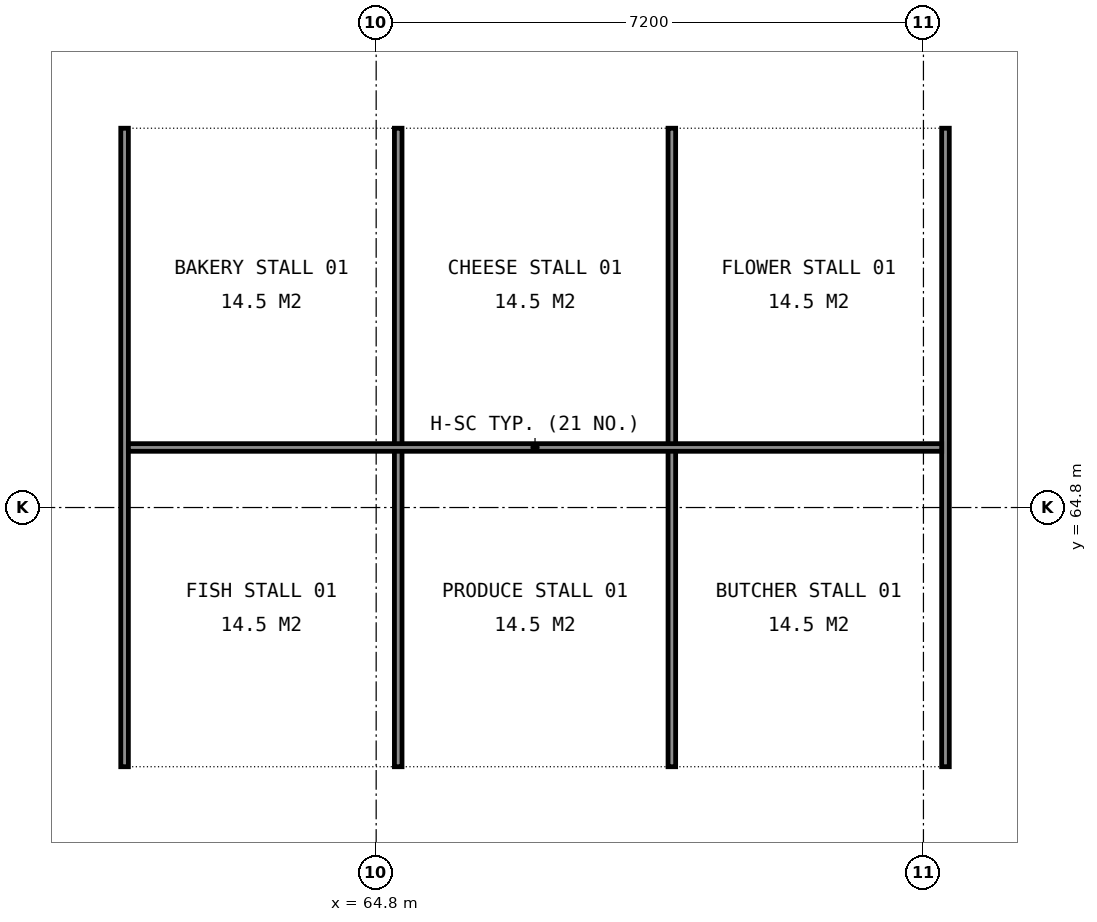
"""IFC4 building model, lengths in metres.
Left out: names, types, materials, properties, quantities, classifications, styles, units other than length and angle.
Written with IfcOpenShell. Run it as: python <this file> out.ifc"""

import sys

from ifc_helpers import new_model, si_unit, direction, frame, frame_2d, origin, place, context, subcontext, project, spatial, rectangle, extrude, element, save


model = new_model("IFC4")
c1 = context("Model", 3, precision=1e-05, world=origin(), true_north=direction((0.0, 1.0)))
c2 = subcontext(c1, "Body", "Model", "MODEL_VIEW")
j1 = project(units=[si_unit("LENGTHUNIT", "METRE"), si_unit("PLANEANGLEUNIT", "RADIAN")], contexts=[c1])
p1 = place(None, origin())
s1 = spatial("IfcSite", under=j1, at=p1, CompositionType="ELEMENT")
p2 = place(p1, origin())
s2 = spatial("IfcBuilding", under=s1, at=p2, CompositionType="ELEMENT")
p3 = place(p2, origin())
s3 = spatial("IfcBuildingStorey", under=s2, at=p3, CompositionType="ELEMENT", Elevation=0.0)
for number, where, z_axis, x_axis in (
    (1, (61.49, 61.39, 0.0), (0.0, 0.0, 1.0), (0.0, 1.0, 0.0)),
    (2, (65.09, 61.39, 0.0), (0.0, 0.0, 1.0), (0.0, 1.0, 0.0)),
    (3, (68.69, 61.39, 0.0), (0.0, 0.0, 1.0), (0.0, 1.0, 0.0)),
    (4, (72.29, 61.39, 0.0), (0.0, 0.0, 1.0), (0.0, 1.0, 0.0)),
):
    element("IfcWall", number, at=place(p3, frame(where, z_axis=z_axis, x_axis=x_axis)), inside=s3, PredefinedType="PARTITIONING", context=c2, shape_type="SweptSolid", body=[
        extrude(rectangle(XDim=8.4, YDim=0.1, at=frame_2d((4.2, 0.0))), origin(), (0.0, 0.0, 1.0), 1.2),
    ])
p4 = place(p3, frame((61.54, 65.59, 0.0), z_axis=(0.0, 0.0, 1.0), x_axis=(1.0, 0.0, 0.0)))
e5 = element("IfcWall", 5, at=p4, inside=s3, PredefinedType="PARTITIONING", context=c2, shape_type="SweptSolid", body=[
    extrude(rectangle(XDim=10.7, YDim=0.1, at=frame_2d((5.35, 0.0))), origin(), (0.0, 0.0, 1.0), 1.2),
])
save(model, sys.argv[1])
